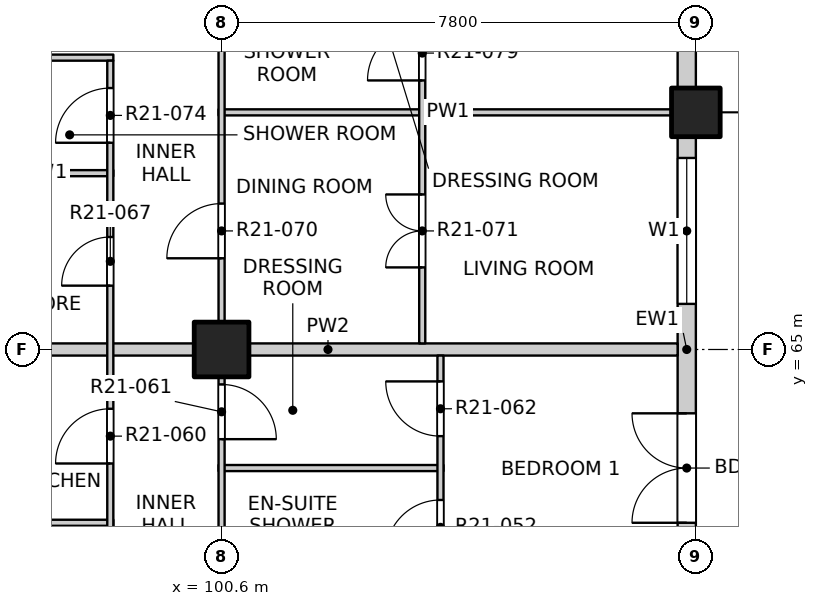
"""IFC4 building model, lengths in metres.
Left out: names, types, materials, properties, quantities, classifications, styles, units other than length and angle.
Written with IfcOpenShell. Run it as: python <this file> out.ifc"""

import sys

from ifc_helpers import new_model, si_unit, direction, frame, frame_2d, origin, origin_2d, place, context, subcontext, project, spatial, rectangle, extrude, element, fill, save


model = new_model("IFC4")
c1 = context("Model", 3, precision=1e-05, world=origin(), true_north=direction((0.0, 1.0)))
c2 = subcontext(c1, "Body", "Model", "MODEL_VIEW")
j1 = project(units=[si_unit("LENGTHUNIT", "METRE"), si_unit("PLANEANGLEUNIT", "RADIAN")], contexts=[c1])
p1 = place(None, origin())
s1 = spatial("IfcSite", under=j1, at=p1, CompositionType="ELEMENT")
p2 = place(p1, origin())
s2 = spatial("IfcBuilding", under=s1, at=p2, CompositionType="ELEMENT")
p3 = place(p2, frame((0.0, 0.0, 214.3)))
s3 = spatial("IfcBuildingStorey", under=s2, at=p3, CompositionType="ELEMENT", Elevation=214.3)
p4 = place(p3, frame((108.4, 68.9, -0.25), z_axis=(0.0, 0.0, 1.0), x_axis=(1.0, 0.0, 0.0)))
e1 = element("IfcColumn", 1, at=p4, inside=s3, PredefinedType="COLUMN", context=c2, shape_type="SweptSolid", body=[
    extrude(rectangle(XDim=0.8, YDim=0.8, at=origin_2d()), origin(), (0.0, 0.0, 1.0), 3.4),
])
p5 = place(p3, frame((100.6, 65.0, -0.25), z_axis=(0.0, 0.0, 1.0), x_axis=(1.0, 0.0, 0.0)))
e2 = element("IfcColumn", 2, at=p5, inside=s3, PredefinedType="COLUMN", context=c2, shape_type="SweptSolid", body=[
    extrude(rectangle(XDim=0.9, YDim=0.9, at=origin_2d()), origin(), (0.0, 0.0, 1.0), 3.4),
])
p6 = place(p3, frame((108.25, 61.5, 0.0), z_axis=(0.0, 0.0, 1.0), x_axis=(0.0, 1.0, 0.0)))
e3 = element("IfcWall", 3, at=p6, inside=s3, PredefinedType="SOLIDWALL", context=c2, shape_type="SweptSolid", body=[
    extrude(rectangle(XDim=7.0, YDim=0.3, at=frame_2d((3.5, 0.0))), origin(), (0.0, 0.0, 1.0), 2.7),
])
p7 = place(p6, frame((0.65, 0.0, 0.0)))
e4 = element("IfcOpeningElement", 4, at=p7, cuts=e3, PredefinedType="OPENING", context=c2, shape_type="SweptSolid", body=[
    extrude(rectangle(XDim=1.8, YDim=2.4, at=frame_2d((0.9, 1.2))), frame((0.0, 0.16, 0.0), z_axis=(0.0, -1.0, 0.0), x_axis=(1.0, 0.0, 0.0)), (0.0, 0.0, 1.0), 0.32),
])
p8 = place(p6, frame((4.25, 0.0, 0.9)))
e5 = element("IfcOpeningElement", 5, at=p8, cuts=e3, PredefinedType="OPENING", context=c2, shape_type="SweptSolid", body=[
    extrude(rectangle(XDim=2.4, YDim=1.8, at=frame_2d((1.2, 0.9))), frame((0.0, 0.16, 0.0), z_axis=(0.0, -1.0, 0.0), x_axis=(1.0, 0.0, 0.0)), (0.0, 0.0, 1.0), 0.32),
])
p9 = place(p3, frame((108.25, 69.3, 0.0), z_axis=(0.0, 0.0, 1.0), x_axis=(0.0, 1.0, 0.0)))
e6 = element("IfcWall", 6, at=p9, inside=s3, PredefinedType="SOLIDWALL", context=c2, shape_type="SweptSolid", body=[
    extrude(rectangle(XDim=7.0, YDim=0.3, at=frame_2d((3.5, 0.0))), origin(), (0.0, 0.0, 1.0), 2.7),
])
p10 = place(p9, frame((0.65, 0.0, 0.0)))
e7 = element("IfcOpeningElement", 7, at=p10, cuts=e6, PredefinedType="OPENING", context=c2, shape_type="SweptSolid", body=[
    extrude(rectangle(XDim=1.8, YDim=2.4, at=frame_2d((0.9, 1.2))), frame((0.0, 0.16, 0.0), z_axis=(0.0, -1.0, 0.0), x_axis=(1.0, 0.0, 0.0)), (0.0, 0.0, 1.0), 0.32),
])
p11 = place(p9, frame((4.25, 0.0, 0.9)))
e8 = element("IfcOpeningElement", 8, at=p11, cuts=e6, PredefinedType="OPENING", context=c2, shape_type="SweptSolid", body=[
    extrude(rectangle(XDim=2.4, YDim=1.8, at=frame_2d((1.2, 0.9))), frame((0.0, 0.16, 0.0), z_axis=(0.0, -1.0, 0.0), x_axis=(1.0, 0.0, 0.0)), (0.0, 0.0, 1.0), 0.32),
])
p12 = place(p3, frame((96.6, 62.15, 0.0), z_axis=(0.0, 0.0, 1.0), x_axis=(1.0, 0.0, 0.0)))
e9 = element("IfcWall", 9, at=p12, inside=s3, PredefinedType="PARTITIONING", context=c2, shape_type="SweptSolid", body=[
    extrude(rectangle(XDim=2.22, YDim=0.1, at=frame_2d((1.11, 0.0))), origin(), (0.0, 0.0, 1.0), 3.15),
])
p13 = place(p3, frame((100.55, 63.05, 0.0), z_axis=(0.0, 0.0, 1.0), x_axis=(1.0, 0.0, 0.0)))
e10 = element("IfcWall", 10, at=p13, inside=s3, PredefinedType="PARTITIONING", context=c2, shape_type="SweptSolid", body=[
    extrude(rectangle(XDim=3.7, YDim=0.1, at=frame_2d((1.85, 0.0))), origin(), (0.0, 0.0, 1.0), 3.15),
])
p14 = place(p3, frame((96.6, 65.0, 0.0), z_axis=(0.0, 0.0, 1.0), x_axis=(1.0, 0.0, 0.0)))
e11 = element("IfcWall", 11, at=p14, inside=s3, PredefinedType="PARTITIONING", context=c2, shape_type="SweptSolid", body=[
    extrude(rectangle(XDim=11.5, YDim=0.2, at=frame_2d((5.75, 0.0))), origin(), (0.0, 0.0, 1.0), 3.15),
])
p15 = place(p3, frame((96.6, 67.9, 0.0), z_axis=(0.0, 0.0, 1.0), x_axis=(1.0, 0.0, 0.0)))
e12 = element("IfcWall", 12, at=p15, inside=s3, PredefinedType="PARTITIONING", context=c2, shape_type="SweptSolid", body=[
    extrude(rectangle(XDim=2.22, YDim=0.1, at=frame_2d((1.11, 0.0))), origin(), (0.0, 0.0, 1.0), 3.15),
])
p16 = place(p3, frame((100.55, 68.9, 0.0), z_axis=(0.0, 0.0, 1.0), x_axis=(1.0, 0.0, 0.0)))
e13 = element("IfcWall", 13, at=p16, inside=s3, PredefinedType="PARTITIONING", context=c2, shape_type="SweptSolid", body=[
    extrude(rectangle(XDim=7.55, YDim=0.1, at=frame_2d((3.775, 0.0))), origin(), (0.0, 0.0, 1.0), 2.55),
])
p17 = place(p3, frame((96.6, 69.8, 0.0), z_axis=(0.0, 0.0, 1.0), x_axis=(1.0, 0.0, 0.0)))
e14 = element("IfcWall", 14, at=p17, inside=s3, PredefinedType="PARTITIONING", context=c2, shape_type="SweptSolid", body=[
    extrude(rectangle(XDim=2.22, YDim=0.1, at=frame_2d((1.11, 0.0))), origin(), (0.0, 0.0, 1.0), 3.15),
])
p18 = place(p3, frame((98.77, 60.2, 0.0), z_axis=(0.0, 0.0, 1.0), x_axis=(0.0, 1.0, 0.0)))
e15 = element("IfcWall", 15, at=p18, inside=s3, PredefinedType="PARTITIONING", context=c2, shape_type="SweptSolid", body=[
    extrude(rectangle(XDim=9.55, YDim=0.1, at=frame_2d((4.775, 0.0))), origin(), (0.0, 0.0, 1.0), 3.15),
])
p19 = place(p18, frame((0.55, 0.0, 0.0)))
e16 = element("IfcOpeningElement", 16, at=p19, cuts=e15, PredefinedType="OPENING", context=c2, shape_type="SweptSolid", body=[
    extrude(rectangle(XDim=0.8, YDim=2.1, at=frame_2d((0.4, 1.05))), frame((0.0, 0.06, 0.0), z_axis=(0.0, -1.0, 0.0), x_axis=(1.0, 0.0, 0.0)), (0.0, 0.0, 1.0), 0.12),
])
p20 = place(p18, frame((2.925, 0.0, 0.0)))
e17 = element("IfcOpeningElement", 17, at=p20, cuts=e15, PredefinedType="OPENING", context=c2, shape_type="SweptSolid", body=[
    extrude(rectangle(XDim=0.9, YDim=2.1, at=frame_2d((0.45, 1.05))), frame((0.0, 0.06, 0.0), z_axis=(0.0, -1.0, 0.0), x_axis=(1.0, 0.0, 0.0)), (0.0, 0.0, 1.0), 0.12),
])
p21 = place(p18, frame((5.85, 0.0, 0.0)))
e18 = element("IfcOpeningElement", 18, at=p21, cuts=e15, PredefinedType="OPENING", context=c2, shape_type="SweptSolid", body=[
    extrude(rectangle(XDim=0.8, YDim=2.1, at=frame_2d((0.4, 1.05))), frame((0.0, 0.06, 0.0), z_axis=(0.0, -1.0, 0.0), x_axis=(1.0, 0.0, 0.0)), (0.0, 0.0, 1.0), 0.12),
])
p22 = place(p18, frame((8.2, 0.0, 0.0)))
e19 = element("IfcOpeningElement", 19, at=p22, cuts=e15, PredefinedType="OPENING", context=c2, shape_type="SweptSolid", body=[
    extrude(rectangle(XDim=0.9, YDim=2.1, at=frame_2d((0.45, 1.05))), frame((0.0, 0.06, 0.0), z_axis=(0.0, -1.0, 0.0), x_axis=(1.0, 0.0, 0.0)), (0.0, 0.0, 1.0), 0.12),
])
p23 = place(p3, frame((100.6, 41.9, 0.0), z_axis=(0.0, 0.0, 1.0), x_axis=(0.0, 1.0, 0.0)))
e20 = element("IfcWall", 20, at=p23, inside=s3, PredefinedType="PARTITIONING", context=c2, shape_type="SweptSolid", body=[
    extrude(rectangle(XDim=46.2, YDim=0.1, at=frame_2d((23.1, 0.0))), origin(), (0.0, 0.0, 1.0), 3.15),
])
p24 = place(p23, frame((1.2, 0.0, 0.0)))
e21 = element("IfcOpeningElement", 21, at=p24, cuts=e20, PredefinedType="OPENING", context=c2, shape_type="SweptSolid", body=[
    extrude(rectangle(XDim=0.9, YDim=2.1, at=frame_2d((0.45, 1.05))), frame((0.0, 0.06, 0.0), z_axis=(0.0, -1.0, 0.0), x_axis=(1.0, 0.0, 0.0)), (0.0, 0.0, 1.0), 0.12),
])
p25 = place(p23, frame((6.025, 0.0, 0.0)))
e22 = element("IfcOpeningElement", 22, at=p25, cuts=e20, PredefinedType="OPENING", context=c2, shape_type="SweptSolid", body=[
    extrude(rectangle(XDim=0.9, YDim=2.1, at=frame_2d((0.45, 1.05))), frame((0.0, 0.06, 0.0), z_axis=(0.0, -1.0, 0.0), x_axis=(1.0, 0.0, 0.0)), (0.0, 0.0, 1.0), 0.12),
])
p26 = place(p23, frame((9.0, 0.0, 0.0)))
e23 = element("IfcOpeningElement", 23, at=p26, cuts=e20, PredefinedType="OPENING", context=c2, shape_type="SweptSolid", body=[
    extrude(rectangle(XDim=0.9, YDim=2.1, at=frame_2d((0.45, 1.05))), frame((0.0, 0.06, 0.0), z_axis=(0.0, -1.0, 0.0), x_axis=(1.0, 0.0, 0.0)), (0.0, 0.0, 1.0), 0.12),
])
p27 = place(p23, frame((13.85, 0.0, 0.0)))
e24 = element("IfcOpeningElement", 24, at=p27, cuts=e20, PredefinedType="OPENING", context=c2, shape_type="SweptSolid", body=[
    extrude(rectangle(XDim=0.9, YDim=2.1, at=frame_2d((0.45, 1.05))), frame((0.0, 0.06, 0.0), z_axis=(0.0, -1.0, 0.0), x_axis=(1.0, 0.0, 0.0)), (0.0, 0.0, 1.0), 0.12),
])
p28 = place(p23, frame((16.8, 0.0, 0.0)))
e25 = element("IfcOpeningElement", 25, at=p28, cuts=e20, PredefinedType="OPENING", context=c2, shape_type="SweptSolid", body=[
    extrude(rectangle(XDim=0.9, YDim=2.1, at=frame_2d((0.45, 1.05))), frame((0.0, 0.06, 0.0), z_axis=(0.0, -1.0, 0.0), x_axis=(1.0, 0.0, 0.0)), (0.0, 0.0, 1.0), 0.12),
])
p29 = place(p23, frame((21.625, 0.0, 0.0)))
e26 = element("IfcOpeningElement", 26, at=p29, cuts=e20, PredefinedType="OPENING", context=c2, shape_type="SweptSolid", body=[
    extrude(rectangle(XDim=0.9, YDim=2.1, at=frame_2d((0.45, 1.05))), frame((0.0, 0.06, 0.0), z_axis=(0.0, -1.0, 0.0), x_axis=(1.0, 0.0, 0.0)), (0.0, 0.0, 1.0), 0.12),
])
p30 = place(p23, frame((24.6, 0.0, 0.0)))
e27 = element("IfcOpeningElement", 27, at=p30, cuts=e20, PredefinedType="OPENING", context=c2, shape_type="SweptSolid", body=[
    extrude(rectangle(XDim=0.9, YDim=2.1, at=frame_2d((0.45, 1.05))), frame((0.0, 0.06, 0.0), z_axis=(0.0, -1.0, 0.0), x_axis=(1.0, 0.0, 0.0)), (0.0, 0.0, 1.0), 0.12),
])
p31 = place(p23, frame((29.425, 0.0, 0.0)))
e28 = element("IfcOpeningElement", 28, at=p31, cuts=e20, PredefinedType="OPENING", context=c2, shape_type="SweptSolid", body=[
    extrude(rectangle(XDim=0.9, YDim=2.1, at=frame_2d((0.45, 1.05))), frame((0.0, 0.06, 0.0), z_axis=(0.0, -1.0, 0.0), x_axis=(1.0, 0.0, 0.0)), (0.0, 0.0, 1.0), 0.12),
])
p32 = place(p23, frame((33.375, 0.0, 0.0)))
e29 = element("IfcOpeningElement", 29, at=p32, cuts=e20, PredefinedType="OPENING", context=c2, shape_type="SweptSolid", body=[
    extrude(rectangle(XDim=0.9, YDim=2.1, at=frame_2d((0.45, 1.05))), frame((0.0, 0.06, 0.0), z_axis=(0.0, -1.0, 0.0), x_axis=(1.0, 0.0, 0.0)), (0.0, 0.0, 1.0), 0.12),
])
p33 = place(p23, frame((36.3, 0.0, 0.0)))
e30 = element("IfcOpeningElement", 30, at=p33, cuts=e20, PredefinedType="OPENING", context=c2, shape_type="SweptSolid", body=[
    extrude(rectangle(XDim=0.9, YDim=2.1, at=frame_2d((0.45, 1.05))), frame((0.0, 0.06, 0.0), z_axis=(0.0, -1.0, 0.0), x_axis=(1.0, 0.0, 0.0)), (0.0, 0.0, 1.0), 0.12),
])
p34 = place(p23, frame((41.175, 0.0, 0.0)))
e31 = element("IfcOpeningElement", 31, at=p34, cuts=e20, PredefinedType="OPENING", context=c2, shape_type="SweptSolid", body=[
    extrude(rectangle(XDim=0.9, YDim=2.1, at=frame_2d((0.45, 1.05))), frame((0.0, 0.06, 0.0), z_axis=(0.0, -1.0, 0.0), x_axis=(1.0, 0.0, 0.0)), (0.0, 0.0, 1.0), 0.12),
])
p35 = place(p23, frame((44.1, 0.0, 0.0)))
e32 = element("IfcOpeningElement", 32, at=p35, cuts=e20, PredefinedType="OPENING", context=c2, shape_type="SweptSolid", body=[
    extrude(rectangle(XDim=0.9, YDim=2.1, at=frame_2d((0.45, 1.05))), frame((0.0, 0.06, 0.0), z_axis=(0.0, -1.0, 0.0), x_axis=(1.0, 0.0, 0.0)), (0.0, 0.0, 1.0), 0.12),
])
p36 = place(p3, frame((103.9, 65.1, 0.0), z_axis=(0.0, 0.0, 1.0), x_axis=(0.0, 1.0, 0.0)))
e33 = element("IfcWall", 33, at=p36, inside=s3, PredefinedType="PARTITIONING", context=c2, shape_type="SweptSolid", body=[
    extrude(rectangle(XDim=11.5, YDim=0.1, at=frame_2d((5.75, 0.0))), origin(), (0.0, 0.0, 1.0), 3.15),
])
p37 = place(p36, frame((1.25, 0.0, 0.0)))
e34 = element("IfcOpeningElement", 34, at=p37, cuts=e33, PredefinedType="OPENING", context=c2, shape_type="SweptSolid", body=[
    extrude(rectangle(XDim=1.2, YDim=2.1, at=frame_2d((0.6, 1.05))), frame((0.0, 0.06, 0.0), z_axis=(0.0, -1.0, 0.0), x_axis=(1.0, 0.0, 0.0)), (0.0, 0.0, 1.0), 0.12),
])
p38 = place(p36, frame((4.325, 0.0, 0.0)))
e35 = element("IfcOpeningElement", 35, at=p38, cuts=e33, PredefinedType="OPENING", context=c2, shape_type="SweptSolid", body=[
    extrude(rectangle(XDim=0.9, YDim=2.1, at=frame_2d((0.45, 1.05))), frame((0.0, 0.06, 0.0), z_axis=(0.0, -1.0, 0.0), x_axis=(1.0, 0.0, 0.0)), (0.0, 0.0, 1.0), 0.12),
])
p39 = place(p36, frame((6.275, 0.0, 0.0)))
e36 = element("IfcOpeningElement", 36, at=p39, cuts=e33, PredefinedType="OPENING", context=c2, shape_type="SweptSolid", body=[
    extrude(rectangle(XDim=0.9, YDim=2.1, at=frame_2d((0.45, 1.05))), frame((0.0, 0.06, 0.0), z_axis=(0.0, -1.0, 0.0), x_axis=(1.0, 0.0, 0.0)), (0.0, 0.0, 1.0), 0.12),
])
p40 = place(p36, frame((8.225, 0.0, 0.0)))
e37 = element("IfcOpeningElement", 37, at=p40, cuts=e33, PredefinedType="OPENING", context=c2, shape_type="SweptSolid", body=[
    extrude(rectangle(XDim=0.9, YDim=2.1, at=frame_2d((0.45, 1.05))), frame((0.0, 0.06, 0.0), z_axis=(0.0, -1.0, 0.0), x_axis=(1.0, 0.0, 0.0)), (0.0, 0.0, 1.0), 0.12),
])
p41 = place(p36, frame((10.175, 0.0, 0.0)))
e38 = element("IfcOpeningElement", 38, at=p41, cuts=e33, PredefinedType="OPENING", context=c2, shape_type="SweptSolid", body=[
    extrude(rectangle(XDim=0.9, YDim=2.1, at=frame_2d((0.45, 1.05))), frame((0.0, 0.06, 0.0), z_axis=(0.0, -1.0, 0.0), x_axis=(1.0, 0.0, 0.0)), (0.0, 0.0, 1.0), 0.12),
])
p42 = place(p3, frame((104.2, 41.9, 0.0), z_axis=(0.0, 0.0, 1.0), x_axis=(0.0, 1.0, 0.0)))
e39 = element("IfcWall", 39, at=p42, inside=s3, PredefinedType="PARTITIONING", context=c2, shape_type="SweptSolid", body=[
    extrude(rectangle(XDim=23.0, YDim=0.1, at=frame_2d((11.5, 0.0))), origin(), (0.0, 0.0, 1.0), 3.15),
])
p43 = place(p42, frame((1.05, 0.0, 0.0)))
e40 = element("IfcOpeningElement", 40, at=p43, cuts=e39, PredefinedType="OPENING", context=c2, shape_type="SweptSolid", body=[
    extrude(rectangle(XDim=1.2, YDim=2.1, at=frame_2d((0.6, 1.05))), frame((0.0, 0.06, 0.0), z_axis=(0.0, -1.0, 0.0), x_axis=(1.0, 0.0, 0.0)), (0.0, 0.0, 1.0), 0.12),
])
p44 = place(p42, frame((4.125, 0.0, 0.0)))
e41 = element("IfcOpeningElement", 41, at=p44, cuts=e39, PredefinedType="OPENING", context=c2, shape_type="SweptSolid", body=[
    extrude(rectangle(XDim=0.9, YDim=2.1, at=frame_2d((0.45, 1.05))), frame((0.0, 0.06, 0.0), z_axis=(0.0, -1.0, 0.0), x_axis=(1.0, 0.0, 0.0)), (0.0, 0.0, 1.0), 0.12),
])
p45 = place(p42, frame((6.075, 0.0, 0.0)))
e42 = element("IfcOpeningElement", 42, at=p45, cuts=e39, PredefinedType="OPENING", context=c2, shape_type="SweptSolid", body=[
    extrude(rectangle(XDim=0.9, YDim=2.1, at=frame_2d((0.45, 1.05))), frame((0.0, 0.06, 0.0), z_axis=(0.0, -1.0, 0.0), x_axis=(1.0, 0.0, 0.0)), (0.0, 0.0, 1.0), 0.12),
])
p46 = place(p42, frame((8.85, 0.0, 0.0)))
e43 = element("IfcOpeningElement", 43, at=p46, cuts=e39, PredefinedType="OPENING", context=c2, shape_type="SweptSolid", body=[
    extrude(rectangle(XDim=1.2, YDim=2.1, at=frame_2d((0.6, 1.05))), frame((0.0, 0.06, 0.0), z_axis=(0.0, -1.0, 0.0), x_axis=(1.0, 0.0, 0.0)), (0.0, 0.0, 1.0), 0.12),
])
p47 = place(p42, frame((11.925, 0.0, 0.0)))
e44 = element("IfcOpeningElement", 44, at=p47, cuts=e39, PredefinedType="OPENING", context=c2, shape_type="SweptSolid", body=[
    extrude(rectangle(XDim=0.9, YDim=2.1, at=frame_2d((0.45, 1.05))), frame((0.0, 0.06, 0.0), z_axis=(0.0, -1.0, 0.0), x_axis=(1.0, 0.0, 0.0)), (0.0, 0.0, 1.0), 0.12),
])
p48 = place(p42, frame((13.875, 0.0, 0.0)))
e45 = element("IfcOpeningElement", 45, at=p48, cuts=e39, PredefinedType="OPENING", context=c2, shape_type="SweptSolid", body=[
    extrude(rectangle(XDim=0.9, YDim=2.1, at=frame_2d((0.45, 1.05))), frame((0.0, 0.06, 0.0), z_axis=(0.0, -1.0, 0.0), x_axis=(1.0, 0.0, 0.0)), (0.0, 0.0, 1.0), 0.12),
])
p49 = place(p42, frame((16.65, 0.0, 0.0)))
e46 = element("IfcOpeningElement", 46, at=p49, cuts=e39, PredefinedType="OPENING", context=c2, shape_type="SweptSolid", body=[
    extrude(rectangle(XDim=1.2, YDim=2.1, at=frame_2d((0.6, 1.05))), frame((0.0, 0.06, 0.0), z_axis=(0.0, -1.0, 0.0), x_axis=(1.0, 0.0, 0.0)), (0.0, 0.0, 1.0), 0.12),
])
p50 = place(p42, frame((19.725, 0.0, 0.0)))
e47 = element("IfcOpeningElement", 47, at=p50, cuts=e39, PredefinedType="OPENING", context=c2, shape_type="SweptSolid", body=[
    extrude(rectangle(XDim=0.9, YDim=2.1, at=frame_2d((0.45, 1.05))), frame((0.0, 0.06, 0.0), z_axis=(0.0, -1.0, 0.0), x_axis=(1.0, 0.0, 0.0)), (0.0, 0.0, 1.0), 0.12),
])
p51 = place(p42, frame((21.675, 0.0, 0.0)))
e48 = element("IfcOpeningElement", 48, at=p51, cuts=e39, PredefinedType="OPENING", context=c2, shape_type="SweptSolid", body=[
    extrude(rectangle(XDim=0.9, YDim=2.1, at=frame_2d((0.45, 1.05))), frame((0.0, 0.06, 0.0), z_axis=(0.0, -1.0, 0.0), x_axis=(1.0, 0.0, 0.0)), (0.0, 0.0, 1.0), 0.12),
])
p52 = place(p7, origin())
e49 = element("IfcDoor", 49, at=p52, inside=s3, OperationType="DOUBLE_DOOR_SINGLE_SWING", PredefinedType="DOOR", context=c2, shape_type="SweptSolid", body=[
    extrude(rectangle(XDim=1.8, YDim=2.4, at=frame_2d((0.9, 1.2))), frame((0.0, 0.025, 0.0), z_axis=(0.0, -1.0, 0.0), x_axis=(1.0, 0.0, 0.0)), (0.0, 0.0, 1.0), 0.05),
])
fill(e4, e49)
p53 = place(p8, origin())
e50 = element("IfcWindow", 50, at=p53, inside=s3, PartitioningType="DOUBLE_PANEL_VERTICAL", PredefinedType="WINDOW", context=c2, shape_type="SweptSolid", body=[
    extrude(rectangle(XDim=2.4, YDim=1.8, at=frame_2d((1.2, 0.9))), frame((0.0, 0.03, 0.0), z_axis=(0.0, -1.0, 0.0), x_axis=(1.0, 0.0, 0.0)), (0.0, 0.0, 1.0), 0.06),
])
fill(e5, e50)
p54 = place(p50, origin())
e51 = element("IfcDoor", 51, at=p54, inside=s3, OperationType="SINGLE_SWING_LEFT", PredefinedType="DOOR", context=c2, shape_type="SweptSolid", body=[
    extrude(rectangle(XDim=0.9, YDim=2.1, at=frame_2d((0.45, 1.05))), frame((0.0, 0.025, 0.0), z_axis=(0.0, -1.0, 0.0), x_axis=(1.0, 0.0, 0.0)), (0.0, 0.0, 1.0), 0.05),
])
fill(e47, e51)
p55 = place(p20, origin())
e52 = element("IfcDoor", 52, at=p55, inside=s3, OperationType="SINGLE_SWING_LEFT", PredefinedType="DOOR", context=c2, shape_type="SweptSolid", body=[
    extrude(rectangle(XDim=0.9, YDim=2.1, at=frame_2d((0.45, 1.05))), frame((0.0, 0.025, 0.0), z_axis=(0.0, -1.0, 0.0), x_axis=(1.0, 0.0, 0.0)), (0.0, 0.0, 1.0), 0.05),
])
fill(e17, e52)
p56 = place(p29, origin())
e53 = element("IfcDoor", 53, at=p56, inside=s3, OperationType="SINGLE_SWING_RIGHT", PredefinedType="DOOR", context=c2, shape_type="SweptSolid", body=[
    extrude(rectangle(XDim=0.9, YDim=2.1, at=frame_2d((0.45, 1.05))), frame((0.0, 0.025, 0.0), z_axis=(0.0, -1.0, 0.0), x_axis=(1.0, 0.0, 0.0)), (0.0, 0.0, 1.0), 0.05),
])
fill(e26, e53)
p57 = place(p51, origin())
e54 = element("IfcDoor", 54, at=p57, inside=s3, OperationType="SINGLE_SWING_RIGHT", PredefinedType="DOOR", context=c2, shape_type="SweptSolid", body=[
    extrude(rectangle(XDim=0.9, YDim=2.1, at=frame_2d((0.45, 1.05))), frame((0.0, 0.025, 0.0), z_axis=(0.0, -1.0, 0.0), x_axis=(1.0, 0.0, 0.0)), (0.0, 0.0, 1.0), 0.05),
])
fill(e48, e54)
p58 = place(p21, origin())
e55 = element("IfcDoor", 55, at=p58, inside=s3, OperationType="SINGLE_SWING_LEFT", PredefinedType="DOOR", context=c2, shape_type="SweptSolid", body=[
    extrude(rectangle(XDim=0.8, YDim=2.1, at=frame_2d((0.4, 1.05))), frame((0.0, 0.025, 0.0), z_axis=(0.0, -1.0, 0.0), x_axis=(1.0, 0.0, 0.0)), (0.0, 0.0, 1.0), 0.05),
])
fill(e18, e55)
p59 = place(p30, origin())
e56 = element("IfcDoor", 56, at=p59, inside=s3, OperationType="SINGLE_SWING_LEFT", PredefinedType="DOOR", context=c2, shape_type="SweptSolid", body=[
    extrude(rectangle(XDim=0.9, YDim=2.1, at=frame_2d((0.45, 1.05))), frame((0.0, 0.025, 0.0), z_axis=(0.0, -1.0, 0.0), x_axis=(1.0, 0.0, 0.0)), (0.0, 0.0, 1.0), 0.05),
])
fill(e27, e56)
p60 = place(p37, origin())
e57 = element("IfcDoor", 57, at=p60, inside=s3, OperationType="DOUBLE_DOOR_SINGLE_SWING", PredefinedType="DOOR", context=c2, shape_type="SweptSolid", body=[
    extrude(rectangle(XDim=1.2, YDim=2.1, at=frame_2d((0.6, 1.05))), frame((0.0, 0.025, 0.0), z_axis=(0.0, -1.0, 0.0), x_axis=(1.0, 0.0, 0.0)), (0.0, 0.0, 1.0), 0.05),
])
fill(e34, e57)
p61 = place(p22, origin())
e58 = element("IfcDoor", 58, at=p61, inside=s3, OperationType="SINGLE_SWING_LEFT", PredefinedType="DOOR", context=c2, shape_type="SweptSolid", body=[
    extrude(rectangle(XDim=0.9, YDim=2.1, at=frame_2d((0.45, 1.05))), frame((0.0, 0.025, 0.0), z_axis=(0.0, -1.0, 0.0), x_axis=(1.0, 0.0, 0.0)), (0.0, 0.0, 1.0), 0.05),
])
fill(e19, e58)
p62 = place(p38, origin())
e59 = element("IfcDoor", 59, at=p62, inside=s3, OperationType="SINGLE_SWING_LEFT", PredefinedType="DOOR", context=c2, shape_type="SweptSolid", body=[
    extrude(rectangle(XDim=0.9, YDim=2.1, at=frame_2d((0.45, 1.05))), frame((0.0, 0.025, 0.0), z_axis=(0.0, -1.0, 0.0), x_axis=(1.0, 0.0, 0.0)), (0.0, 0.0, 1.0), 0.05),
])
fill(e35, e59)
save(model, sys.argv[1])
